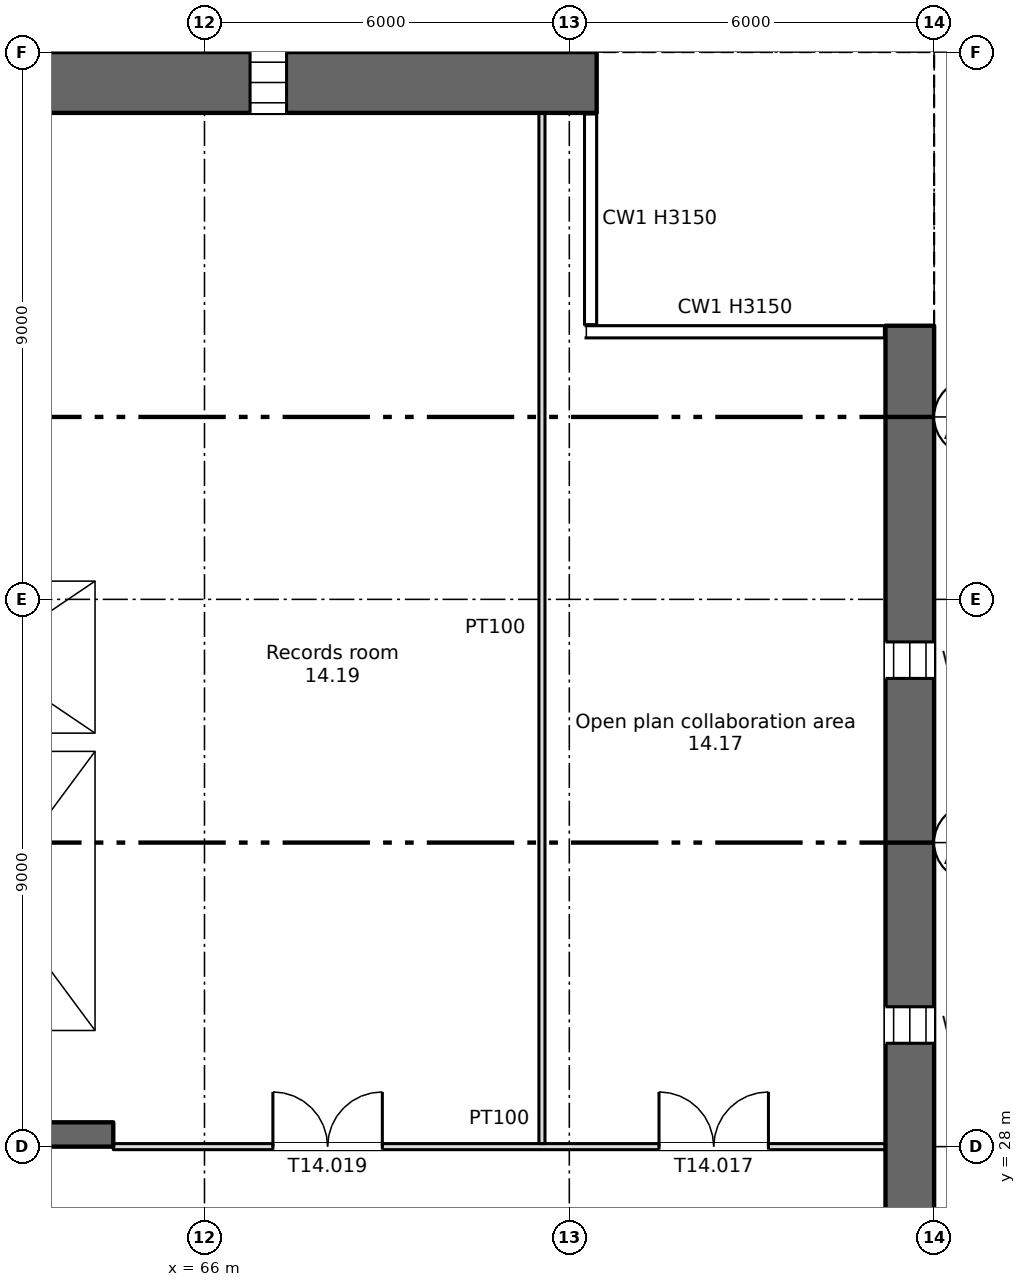
"""IFC4 building model, lengths in metres.
Left out: names, types, materials, properties, quantities, classifications, styles, units other than length and angle.
Written with IfcOpenShell. Run it as: python <this file> out.ifc"""

import sys

from ifc_helpers import new_model, si_unit, direction, frame, frame_2d, origin, place, context, subcontext, project, spatial, rectangle, extrude, element, fill, save


model = new_model("IFC4")
c1 = context("Model", 3, precision=1e-05, world=origin(), true_north=direction((0.0, 1.0)))
c2 = subcontext(c1, "Body", "Model", "MODEL_VIEW")
j1 = project(units=[si_unit("LENGTHUNIT", "METRE"), si_unit("PLANEANGLEUNIT", "RADIAN")], contexts=[c1])
p1 = place(None, origin())
s1 = spatial("IfcSite", under=j1, at=p1, CompositionType="ELEMENT")
p2 = place(p1, origin())
s2 = spatial("IfcBuilding", under=s1, at=p2, CompositionType="ELEMENT")
p3 = place(p2, frame((0.0, 0.0, 86.25)))
s3 = spatial("IfcBuildingStorey", under=s2, at=p3, CompositionType="ELEMENT", Elevation=86.25)
p4 = place(p3, frame((77.6, 4.5, 0.0), z_axis=(0.0, 0.0, 1.0), x_axis=(0.0, 1.0, 0.0)))
e1 = element("IfcWall", 1, at=p4, inside=s3, PredefinedType="SHEAR", context=c2, shape_type="SweptSolid", body=[
    extrude(rectangle(XDim=37.0, YDim=0.8, at=frame_2d((18.5, 0.0))), origin(), (0.0, 0.0, 1.0), 3.15),
])
p5 = place(p4, frame((1.2, 0.0, 0.6)))
e2 = element("IfcOpeningElement", 2, at=p5, cuts=e1, PredefinedType="OPENING", context=c2, shape_type="SweptSolid", body=[
    extrude(rectangle(XDim=0.6, YDim=2.4, at=frame_2d((0.3, 1.2))), frame((0.0, 0.41, 0.0), z_axis=(0.0, -1.0, 0.0), x_axis=(1.0, 0.0, 0.0)), (0.0, 0.0, 1.0), 0.82),
])
p6 = place(p4, frame((7.2, 0.0, 0.6)))
e3 = element("IfcOpeningElement", 3, at=p6, cuts=e1, PredefinedType="OPENING", context=c2, shape_type="SweptSolid", body=[
    extrude(rectangle(XDim=0.6, YDim=2.4, at=frame_2d((0.3, 1.2))), frame((0.0, 0.41, 0.0), z_axis=(0.0, -1.0, 0.0), x_axis=(1.0, 0.0, 0.0)), (0.0, 0.0, 1.0), 0.82),
])
p7 = place(p4, frame((13.2, 0.0, 0.6)))
e4 = element("IfcOpeningElement", 4, at=p7, cuts=e1, PredefinedType="OPENING", context=c2, shape_type="SweptSolid", body=[
    extrude(rectangle(XDim=0.6, YDim=2.4, at=frame_2d((0.3, 1.2))), frame((0.0, 0.41, 0.0), z_axis=(0.0, -1.0, 0.0), x_axis=(1.0, 0.0, 0.0)), (0.0, 0.0, 1.0), 0.82),
])
p8 = place(p4, frame((19.2, 0.0, 0.6)))
e5 = element("IfcOpeningElement", 5, at=p8, cuts=e1, PredefinedType="OPENING", context=c2, shape_type="SweptSolid", body=[
    extrude(rectangle(XDim=0.6, YDim=2.4, at=frame_2d((0.3, 1.2))), frame((0.0, 0.41, 0.0), z_axis=(0.0, -1.0, 0.0), x_axis=(1.0, 0.0, 0.0)), (0.0, 0.0, 1.0), 0.82),
])
p9 = place(p4, frame((25.2, 0.0, 0.6)))
e6 = element("IfcOpeningElement", 6, at=p9, cuts=e1, PredefinedType="OPENING", context=c2, shape_type="SweptSolid", body=[
    extrude(rectangle(XDim=0.6, YDim=2.4, at=frame_2d((0.3, 1.2))), frame((0.0, 0.41, 0.0), z_axis=(0.0, -1.0, 0.0), x_axis=(1.0, 0.0, 0.0)), (0.0, 0.0, 1.0), 0.82),
])
p10 = place(p4, frame((31.2, 0.0, 0.6)))
e7 = element("IfcOpeningElement", 7, at=p10, cuts=e1, PredefinedType="OPENING", context=c2, shape_type="SweptSolid", body=[
    extrude(rectangle(XDim=0.6, YDim=2.4, at=frame_2d((0.3, 1.2))), frame((0.0, 0.41, 0.0), z_axis=(0.0, -1.0, 0.0), x_axis=(1.0, 0.0, 0.0)), (0.0, 0.0, 1.0), 0.82),
])
p11 = place(p3, frame((5.55, 45.5, 0.0), z_axis=(0.0, 0.0, 1.0), x_axis=(1.0, 0.0, 0.0)))
e8 = element("IfcWall", 8, at=p11, inside=s3, PredefinedType="SHEAR", context=c2, shape_type="SweptSolid", body=[
    extrude(rectangle(XDim=66.9, YDim=1.0, at=frame_2d((33.45, 0.0))), origin(), (0.0, 0.0, 1.0), 3.15),
])
p12 = place(p11, frame((1.2, 0.0, 0.6)))
e9 = element("IfcOpeningElement", 9, at=p12, cuts=e8, PredefinedType="OPENING", context=c2, shape_type="SweptSolid", body=[
    extrude(rectangle(XDim=0.6, YDim=2.4, at=frame_2d((0.3, 1.2))), frame((0.0, 0.51, 0.0), z_axis=(0.0, -1.0, 0.0), x_axis=(1.0, 0.0, 0.0)), (0.0, 0.0, 1.0), 1.02),
])
p13 = place(p11, frame((7.2, 0.0, 0.6)))
e10 = element("IfcOpeningElement", 10, at=p13, cuts=e8, PredefinedType="OPENING", context=c2, shape_type="SweptSolid", body=[
    extrude(rectangle(XDim=0.6, YDim=2.4, at=frame_2d((0.3, 1.2))), frame((0.0, 0.51, 0.0), z_axis=(0.0, -1.0, 0.0), x_axis=(1.0, 0.0, 0.0)), (0.0, 0.0, 1.0), 1.02),
])
p14 = place(p11, frame((55.2, 0.0, 0.6)))
e11 = element("IfcOpeningElement", 11, at=p14, cuts=e8, PredefinedType="OPENING", context=c2, shape_type="SweptSolid", body=[
    extrude(rectangle(XDim=0.6, YDim=2.4, at=frame_2d((0.3, 1.2))), frame((0.0, 0.51, 0.0), z_axis=(0.0, -1.0, 0.0), x_axis=(1.0, 0.0, 0.0)), (0.0, 0.0, 1.0), 1.02),
])
p15 = place(p11, frame((61.2, 0.0, 0.6)))
e12 = element("IfcOpeningElement", 12, at=p15, cuts=e8, PredefinedType="OPENING", context=c2, shape_type="SweptSolid", body=[
    extrude(rectangle(XDim=0.6, YDim=2.4, at=frame_2d((0.3, 1.2))), frame((0.0, 0.51, 0.0), z_axis=(0.0, -1.0, 0.0), x_axis=(1.0, 0.0, 0.0)), (0.0, 0.0, 1.0), 1.02),
])
p16 = place(p3, frame((6.7, 28.2, 0.0), z_axis=(0.0, 0.0, 1.0), x_axis=(1.0, 0.0, 0.0)))
e13 = element("IfcWall", 13, at=p16, inside=s3, PredefinedType="SHEAR", context=c2, shape_type="SweptSolid", body=[
    extrude(rectangle(XDim=57.8, YDim=0.4, at=frame_2d((28.9, 0.0))), origin(), (0.0, 0.0, 1.0), 3.15),
])
p17 = place(p16, frame((12.812, 0.0, 0.0)))
e14 = element("IfcOpeningElement", 14, at=p17, cuts=e13, PredefinedType="OPENING", context=c2, shape_type="SweptSolid", body=[
    extrude(rectangle(XDim=0.9, YDim=2.1, at=frame_2d((0.45, 1.05))), frame((0.0, 0.21, 0.0), z_axis=(0.0, -1.0, 0.0), x_axis=(1.0, 0.0, 0.0)), (0.0, 0.0, 1.0), 0.42),
])
p18 = place(p16, frame((15.387, 0.0, 0.0)))
e15 = element("IfcOpeningElement", 15, at=p18, cuts=e13, PredefinedType="OPENING", context=c2, shape_type="SweptSolid", body=[
    extrude(rectangle(XDim=0.9, YDim=2.1, at=frame_2d((0.45, 1.05))), frame((0.0, 0.21, 0.0), z_axis=(0.0, -1.0, 0.0), x_axis=(1.0, 0.0, 0.0)), (0.0, 0.0, 1.0), 0.42),
])
p19 = place(p16, frame((48.312, 0.0, 0.0)))
e16 = element("IfcOpeningElement", 16, at=p19, cuts=e13, PredefinedType="OPENING", context=c2, shape_type="SweptSolid", body=[
    extrude(rectangle(XDim=0.9, YDim=2.1, at=frame_2d((0.45, 1.05))), frame((0.0, 0.21, 0.0), z_axis=(0.0, -1.0, 0.0), x_axis=(1.0, 0.0, 0.0)), (0.0, 0.0, 1.0), 0.42),
])
p20 = place(p16, frame((50.887, 0.0, 0.0)))
e17 = element("IfcOpeningElement", 17, at=p20, cuts=e13, PredefinedType="OPENING", context=c2, shape_type="SweptSolid", body=[
    extrude(rectangle(XDim=0.9, YDim=2.1, at=frame_2d((0.45, 1.05))), frame((0.0, 0.21, 0.0), z_axis=(0.0, -1.0, 0.0), x_axis=(1.0, 0.0, 0.0)), (0.0, 0.0, 1.0), 0.42),
])
p21 = place(p16, frame((0.562, 0.0, 0.0)))
e18 = element("IfcOpeningElement", 18, at=p21, cuts=e13, PredefinedType="OPENING", context=c2, shape_type="SweptSolid", body=[
    extrude(rectangle(XDim=0.9, YDim=2.1, at=frame_2d((0.45, 1.05))), frame((0.0, 0.21, 0.0), z_axis=(0.0, -1.0, 0.0), x_axis=(1.0, 0.0, 0.0)), (0.0, 0.0, 1.0), 0.42),
])
p22 = place(p16, frame((2.137, 0.0, 0.0)))
e19 = element("IfcOpeningElement", 19, at=p22, cuts=e13, PredefinedType="OPENING", context=c2, shape_type="SweptSolid", body=[
    extrude(rectangle(XDim=0.9, YDim=2.1, at=frame_2d((0.45, 1.05))), frame((0.0, 0.21, 0.0), z_axis=(0.0, -1.0, 0.0), x_axis=(1.0, 0.0, 0.0)), (0.0, 0.0, 1.0), 0.42),
])
p23 = place(p16, frame((4.7, 0.0, 0.0)))
e20 = element("IfcOpeningElement", 20, at=p23, cuts=e13, PredefinedType="OPENING", context=c2, shape_type="SweptSolid", body=[
    extrude(rectangle(XDim=1.2, YDim=2.1, at=frame_2d((0.6, 1.05))), frame((0.0, 0.21, 0.0), z_axis=(0.0, -1.0, 0.0), x_axis=(1.0, 0.0, 0.0)), (0.0, 0.0, 1.0), 0.42),
])
p24 = place(p16, frame((31.7, 0.0, 0.0)))
e21 = element("IfcOpeningElement", 21, at=p24, cuts=e13, PredefinedType="OPENING", context=c2, shape_type="SweptSolid", body=[
    extrude(rectangle(XDim=1.2, YDim=2.1, at=frame_2d((0.6, 1.05))), frame((0.0, 0.21, 0.0), z_axis=(0.0, -1.0, 0.0), x_axis=(1.0, 0.0, 0.0)), (0.0, 0.0, 1.0), 0.42),
])
p25 = place(p16, frame((55.2, 0.0, 0.0)))
e22 = element("IfcOpeningElement", 22, at=p25, cuts=e13, PredefinedType="OPENING", context=c2, shape_type="SweptSolid", body=[
    extrude(rectangle(XDim=1.2, YDim=2.1, at=frame_2d((0.6, 1.05))), frame((0.0, 0.21, 0.0), z_axis=(0.0, -1.0, 0.0), x_axis=(1.0, 0.0, 0.0)), (0.0, 0.0, 1.0), 0.42),
])
p26 = place(p16, frame((21.7, 0.0, 0.0)))
e23 = element("IfcOpeningElement", 23, at=p26, cuts=e13, PredefinedType="OPENING", context=c2, shape_type="SweptSolid", body=[
    extrude(rectangle(XDim=1.2, YDim=2.1, at=frame_2d((0.6, 1.05))), frame((0.0, 0.21, 0.0), z_axis=(0.0, -1.0, 0.0), x_axis=(1.0, 0.0, 0.0)), (0.0, 0.0, 1.0), 0.42),
])
p27 = place(p16, frame((41.7, 0.0, 0.0)))
e24 = element("IfcOpeningElement", 24, at=p27, cuts=e13, PredefinedType="OPENING", context=c2, shape_type="SweptSolid", body=[
    extrude(rectangle(XDim=1.2, YDim=2.1, at=frame_2d((0.6, 1.05))), frame((0.0, 0.21, 0.0), z_axis=(0.0, -1.0, 0.0), x_axis=(1.0, 0.0, 0.0)), (0.0, 0.0, 1.0), 0.42),
])
p28 = place(p16, frame((24.85, 0.0, 0.0)))
e25 = element("IfcOpeningElement", 25, at=p28, cuts=e13, PredefinedType="OPENING", context=c2, shape_type="SweptSolid", body=[
    extrude(rectangle(XDim=2.4, YDim=2.1, at=frame_2d((1.2, 1.05))), frame((0.0, 0.21, 0.0), z_axis=(0.0, -1.0, 0.0), x_axis=(1.0, 0.0, 0.0)), (0.0, 0.0, 1.0), 0.42),
])
p29 = place(p16, frame((37.35, 0.0, 0.0)))
e26 = element("IfcOpeningElement", 26, at=p29, cuts=e13, PredefinedType="OPENING", context=c2, shape_type="SweptSolid", body=[
    extrude(rectangle(XDim=2.4, YDim=2.1, at=frame_2d((1.2, 1.05))), frame((0.0, 0.21, 0.0), z_axis=(0.0, -1.0, 0.0), x_axis=(1.0, 0.0, 0.0)), (0.0, 0.0, 1.0), 0.42),
])
p30 = place(p16, frame((7.85, 0.0, 0.0)))
e27 = element("IfcOpeningElement", 27, at=p30, cuts=e13, PredefinedType="OPENING", context=c2, shape_type="SweptSolid", body=[
    extrude(rectangle(XDim=2.4, YDim=2.1, at=frame_2d((1.2, 1.05))), frame((0.0, 0.21, 0.0), z_axis=(0.0, -1.0, 0.0), x_axis=(1.0, 0.0, 0.0)), (0.0, 0.0, 1.0), 0.42),
])
p31 = place(p16, frame((28.85, 0.0, 0.0)))
e28 = element("IfcOpeningElement", 28, at=p31, cuts=e13, PredefinedType="OPENING", context=c2, shape_type="SweptSolid", body=[
    extrude(rectangle(XDim=0.9, YDim=2.1, at=frame_2d((0.45, 1.05))), frame((0.0, 0.21, 0.0), z_axis=(0.0, -1.0, 0.0), x_axis=(1.0, 0.0, 0.0)), (0.0, 0.0, 1.0), 0.42),
])
p32 = place(p16, frame((34.85, 0.0, 0.0)))
e29 = element("IfcOpeningElement", 29, at=p32, cuts=e13, PredefinedType="OPENING", context=c2, shape_type="SweptSolid", body=[
    extrude(rectangle(XDim=0.9, YDim=2.1, at=frame_2d((0.45, 1.05))), frame((0.0, 0.21, 0.0), z_axis=(0.0, -1.0, 0.0), x_axis=(1.0, 0.0, 0.0)), (0.0, 0.0, 1.0), 0.42),
])
p33 = place(p3, frame((64.35, 34.8, 0.0), z_axis=(0.0, 0.0, 1.0), x_axis=(0.0, 1.0, 0.0)))
e30 = element("IfcWall", 30, at=p33, inside=s3, PredefinedType="SHEAR", context=c2, shape_type="SweptSolid", body=[
    extrude(rectangle(XDim=10.2, YDim=0.3, at=frame_2d((5.1, 0.0))), origin(), (0.0, 0.0, 1.0), 3.15),
])
p34 = place(p3, frame((64.35, 28.4, 0.0), z_axis=(0.0, 0.0, 1.0), x_axis=(0.0, 1.0, 0.0)))
e31 = element("IfcWall", 31, at=p34, inside=s3, PredefinedType="SHEAR", context=c2, shape_type="SweptSolid", body=[
    extrude(rectangle(XDim=6.1, YDim=0.3, at=frame_2d((3.05, 0.0))), origin(), (0.0, 0.0, 1.0), 3.15),
])
p35 = place(p3, frame((60.5, 34.65, 0.0), z_axis=(0.0, 0.0, 1.0), x_axis=(1.0, 0.0, 0.0)))
e32 = element("IfcWall", 32, at=p35, inside=s3, PredefinedType="SHEAR", context=c2, shape_type="SweptSolid", body=[
    extrude(rectangle(XDim=4.0, YDim=0.3, at=frame_2d((2.0, 0.0))), origin(), (0.0, 0.0, 1.0), 3.15),
])
p36 = place(p3, frame((60.5, 37.45, 0.0), z_axis=(0.0, 0.0, 1.0), x_axis=(1.0, 0.0, 0.0)))
e33 = element("IfcWall", 33, at=p36, inside=s3, PredefinedType="SHEAR", context=c2, shape_type="SweptSolid", body=[
    extrude(rectangle(XDim=3.7, YDim=0.3, at=frame_2d((1.85, 0.0))), origin(), (0.0, 0.0, 1.0), 3.15),
])
p37 = place(p36, frame((1.3, 0.0, 0.0)))
e34 = element("IfcOpeningElement", 34, at=p37, cuts=e33, PredefinedType="OPENING", context=c2, shape_type="SweptSolid", body=[
    extrude(rectangle(XDim=1.1, YDim=2.1, at=frame_2d((0.55, 1.05))), frame((0.0, 0.16, 0.0), z_axis=(0.0, -1.0, 0.0), x_axis=(1.0, 0.0, 0.0)), (0.0, 0.0, 1.0), 0.32),
])
p38 = place(p3, frame((64.5, 28.0, 0.0), z_axis=(0.0, 0.0, 1.0), x_axis=(1.0, 0.0, 0.0)))
e35 = element("IfcWall", 35, at=p38, inside=s3, PredefinedType="PARTITIONING", context=c2, shape_type="SweptSolid", body=[
    extrude(rectangle(XDim=12.7, YDim=0.1, at=frame_2d((6.35, 0.0))), origin(), (0.0, 0.0, 1.0), 3.15),
])
p39 = place(p38, frame((8.975, 0.0, 0.0)))
e36 = element("IfcOpeningElement", 36, at=p39, cuts=e35, PredefinedType="OPENING", context=c2, shape_type="SweptSolid", body=[
    extrude(rectangle(XDim=1.8, YDim=2.1, at=frame_2d((0.9, 1.05))), frame((0.0, 0.06, 0.0), z_axis=(0.0, -1.0, 0.0), x_axis=(1.0, 0.0, 0.0)), (0.0, 0.0, 1.0), 0.12),
])
p40 = place(p38, frame((2.625, 0.0, 0.0)))
e37 = element("IfcOpeningElement", 37, at=p40, cuts=e35, PredefinedType="OPENING", context=c2, shape_type="SweptSolid", body=[
    extrude(rectangle(XDim=1.8, YDim=2.1, at=frame_2d((0.9, 1.05))), frame((0.0, 0.06, 0.0), z_axis=(0.0, -1.0, 0.0), x_axis=(1.0, 0.0, 0.0)), (0.0, 0.0, 1.0), 0.12),
])
p41 = place(p3, frame((71.55, 28.05, 0.0), z_axis=(0.0, 0.0, 1.0), x_axis=(0.0, 1.0, 0.0)))
e38 = element("IfcWall", 38, at=p41, inside=s3, PredefinedType="PARTITIONING", context=c2, shape_type="SweptSolid", body=[
    extrude(rectangle(XDim=16.95, YDim=0.1, at=frame_2d((8.475, 0.0))), origin(), (0.0, 0.0, 1.0), 3.15),
])
p42 = place(p15, origin())
e39 = element("IfcWindow", 39, at=p42, inside=s3, PartitioningType="SINGLE_PANEL", PredefinedType="WINDOW", context=c2, shape_type="SweptSolid", body=[
    extrude(rectangle(XDim=0.6, YDim=2.4, at=frame_2d((0.3, 1.2))), frame((0.0, 0.03, 0.0), z_axis=(0.0, -1.0, 0.0), x_axis=(1.0, 0.0, 0.0)), (0.0, 0.0, 1.0), 0.06),
])
fill(e12, e39)
p43 = place(p9, origin())
e40 = element("IfcWindow", 40, at=p43, inside=s3, PartitioningType="SINGLE_PANEL", PredefinedType="WINDOW", context=c2, shape_type="SweptSolid", body=[
    extrude(rectangle(XDim=0.6, YDim=2.4, at=frame_2d((0.3, 1.2))), frame((0.0, 0.03, 0.0), z_axis=(0.0, -1.0, 0.0), x_axis=(1.0, 0.0, 0.0)), (0.0, 0.0, 1.0), 0.06),
])
fill(e6, e40)
p44 = place(p10, origin())
e41 = element("IfcWindow", 41, at=p44, inside=s3, PartitioningType="SINGLE_PANEL", PredefinedType="WINDOW", context=c2, shape_type="SweptSolid", body=[
    extrude(rectangle(XDim=0.6, YDim=2.4, at=frame_2d((0.3, 1.2))), frame((0.0, 0.03, 0.0), z_axis=(0.0, -1.0, 0.0), x_axis=(1.0, 0.0, 0.0)), (0.0, 0.0, 1.0), 0.06),
])
fill(e7, e41)
p45 = place(p39, origin())
e42 = element("IfcDoor", 42, at=p45, inside=s3, OperationType="DOUBLE_DOOR_SINGLE_SWING", PredefinedType="DOOR", context=c2, shape_type="SweptSolid", body=[
    extrude(rectangle(XDim=1.8, YDim=2.1, at=frame_2d((0.9, 1.05))), frame((0.0, 0.025, 0.0), z_axis=(0.0, -1.0, 0.0), x_axis=(1.0, 0.0, 0.0)), (0.0, 0.0, 1.0), 0.05),
])
fill(e36, e42)
p46 = place(p40, origin())
e43 = element("IfcDoor", 43, at=p46, inside=s3, OperationType="DOUBLE_DOOR_SINGLE_SWING", PredefinedType="DOOR", context=c2, shape_type="SweptSolid", body=[
    extrude(rectangle(XDim=1.8, YDim=2.1, at=frame_2d((0.9, 1.05))), frame((0.0, 0.025, 0.0), z_axis=(0.0, -1.0, 0.0), x_axis=(1.0, 0.0, 0.0)), (0.0, 0.0, 1.0), 0.05),
])
fill(e37, e43)
save(model, sys.argv[1])
